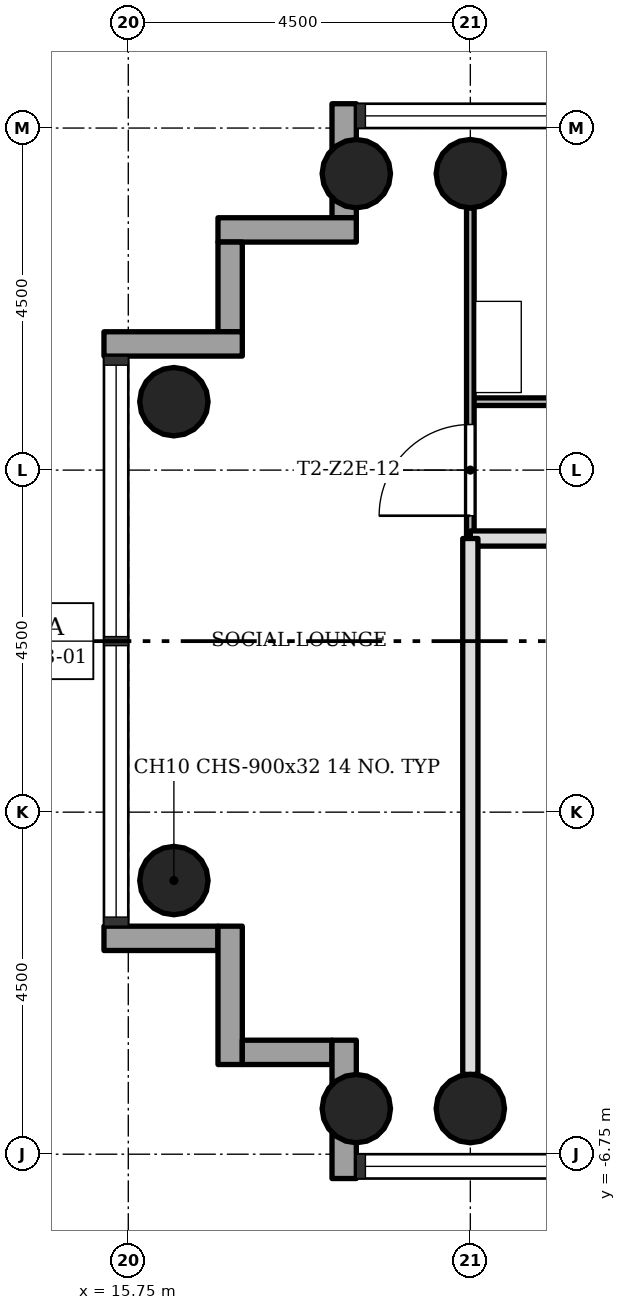
"""IFC4 building model, lengths in metres.
Left out: names, types, materials, properties, quantities, classifications, styles, units other than length and angle.
Written with IfcOpenShell. Run it as: python <this file> out.ifc"""

import sys

from ifc_helpers import new_model, si_unit, direction, frame, frame_2d, origin, origin_2d, place, context, subcontext, project, spatial, rectangle, hollow_circle, extrude, element, fill, save


model = new_model("IFC4")
c1 = context("Model", 3, precision=1e-05, world=origin(), true_north=direction((0.0, 1.0)))
c2 = subcontext(c1, "Body", "Model", "MODEL_VIEW")
j1 = project(units=[si_unit("LENGTHUNIT", "METRE"), si_unit("PLANEANGLEUNIT", "RADIAN")], contexts=[c1])
p1 = place(None, origin())
s1 = spatial("IfcSite", under=j1, at=p1, CompositionType="ELEMENT")
p2 = place(p1, origin())
s2 = spatial("IfcBuilding", under=s1, at=p2, CompositionType="ELEMENT")
p3 = place(p2, frame((0.0, 0.0, 103.8)))
s3 = spatial("IfcBuildingStorey", under=s2, at=p3, CompositionType="ELEMENT", Elevation=103.8)
for number, where, z_axis, x_axis in (
    (1, (20.25, 6.15, 0.0), (0.0, 0.0, 1.0), (1.0, 0.0, 0.0)),
    (2, (20.25, -6.15, 0.0), (0.0, 0.0, 1.0), (1.0, 0.0, 0.0)),
    (3, (18.75, 6.15, 0.0), (0.0, 0.0, 1.0), (1.0, 0.0, 0.0)),
    (4, (18.75, -6.15, 0.0), (0.0, 0.0, 1.0), (1.0, 0.0, 0.0)),
    (5, (16.35, 3.15, 0.0), (0.0, 0.0, 1.0), (1.0, 0.0, 0.0)),
    (6, (16.35, -3.15, 0.0), (0.0, 0.0, 1.0), (1.0, 0.0, 0.0)),
):
    element("IfcColumn", number, at=place(p3, frame(where, z_axis=z_axis, x_axis=x_axis)), inside=s3, PredefinedType="COLUMN", context=c2, shape_type="SweptSolid", body=[
        extrude(hollow_circle(Radius=0.45, WallThickness=0.032, at=origin_2d()), origin(), (0.0, 0.0, 1.0), 3.4),
    ])
p4 = place(p3, frame((18.59, 7.07, -0.3), z_axis=(0.0, 0.0, 1.0), x_axis=(0.0, -1.0, 0.0)))
e7 = element("IfcWall", 7, at=p4, inside=s3, PredefinedType="STANDARD", context=c2, shape_type="SweptSolid", body=[
    extrude(rectangle(XDim=1.5, YDim=0.32, at=frame_2d((0.75, 0.0))), origin(), (0.0, 0.0, 1.0), 3.4),
])
p5 = place(p3, frame((18.75, 5.41, -0.3), z_axis=(0.0, 0.0, 1.0), x_axis=(-1.0, 0.0, 0.0)))
e8 = element("IfcWall", 8, at=p5, inside=s3, PredefinedType="STANDARD", context=c2, shape_type="SweptSolid", body=[
    extrude(rectangle(XDim=1.82, YDim=0.32, at=frame_2d((0.91, 0.0))), origin(), (0.0, 0.0, 1.0), 3.4),
])
p6 = place(p3, frame((17.09, 5.25, -0.3), z_axis=(0.0, 0.0, 1.0), x_axis=(0.0, -1.0, 0.0)))
e9 = element("IfcWall", 9, at=p6, inside=s3, PredefinedType="STANDARD", context=c2, shape_type="SweptSolid", body=[
    extrude(rectangle(XDim=1.18, YDim=0.32, at=frame_2d((0.59, 0.0))), origin(), (0.0, 0.0, 1.0), 3.4),
])
p7 = place(p3, frame((17.25, 3.91, -0.3), z_axis=(0.0, 0.0, 1.0), x_axis=(-1.0, 0.0, 0.0)))
e10 = element("IfcWall", 10, at=p7, inside=s3, PredefinedType="STANDARD", context=c2, shape_type="SweptSolid", body=[
    extrude(rectangle(XDim=1.82, YDim=0.32, at=frame_2d((0.91, 0.0))), origin(), (0.0, 0.0, 1.0), 3.4),
])
p8 = place(p3, frame((15.43, -3.91, -0.3), z_axis=(0.0, 0.0, 1.0), x_axis=(1.0, 0.0, 0.0)))
e11 = element("IfcWall", 11, at=p8, inside=s3, PredefinedType="STANDARD", context=c2, shape_type="SweptSolid", body=[
    extrude(rectangle(XDim=1.5, YDim=0.32, at=frame_2d((0.75, 0.0))), origin(), (0.0, 0.0, 1.0), 3.4),
])
p9 = place(p3, frame((17.09, -3.75, -0.3), z_axis=(0.0, 0.0, 1.0), x_axis=(0.0, -1.0, 0.0)))
e12 = element("IfcWall", 12, at=p9, inside=s3, PredefinedType="STANDARD", context=c2, shape_type="SweptSolid", body=[
    extrude(rectangle(XDim=1.82, YDim=0.32, at=frame_2d((0.91, 0.0))), origin(), (0.0, 0.0, 1.0), 3.4),
])
p10 = place(p3, frame((17.25, -5.41, -0.3), z_axis=(0.0, 0.0, 1.0), x_axis=(1.0, 0.0, 0.0)))
e13 = element("IfcWall", 13, at=p10, inside=s3, PredefinedType="STANDARD", context=c2, shape_type="SweptSolid", body=[
    extrude(rectangle(XDim=1.18, YDim=0.32, at=frame_2d((0.59, 0.0))), origin(), (0.0, 0.0, 1.0), 3.4),
])
p11 = place(p3, frame((18.59, -5.25, -0.3), z_axis=(0.0, 0.0, 1.0), x_axis=(0.0, -1.0, 0.0)))
e14 = element("IfcWall", 14, at=p11, inside=s3, PredefinedType="STANDARD", context=c2, shape_type="SweptSolid", body=[
    extrude(rectangle(XDim=1.82, YDim=0.32, at=frame_2d((0.91, 0.0))), origin(), (0.0, 0.0, 1.0), 3.4),
])
p12 = place(p3, frame((27.45, 1.35, 0.0), z_axis=(0.0, 0.0, 1.0), x_axis=(-1.0, 0.0, 0.0)))
e15 = element("IfcWall", 15, at=p12, inside=s3, PredefinedType="SOLIDWALL", context=c2, shape_type="SweptSolid", body=[
    extrude(rectangle(XDim=7.2, YDim=0.2, at=frame_2d((3.6, 0.0))), origin(), (0.0, 0.0, 1.0), 3.0),
])
p13 = place(p12, frame((4.35, 0.0, 0.0)))
e16 = element("IfcOpeningElement", 16, at=p13, cuts=e15, PredefinedType="OPENING", context=c2, shape_type="SweptSolid", body=[
    extrude(rectangle(XDim=0.9, YDim=2.1, at=frame_2d((0.45, 1.05))), frame((0.0, 0.11, 0.0), z_axis=(0.0, -1.0, 0.0), x_axis=(1.0, 0.0, 0.0)), (0.0, 0.0, 1.0), 0.22),
])
p14 = place(p3, frame((29.25, 3.15, 0.0), z_axis=(0.0, 0.0, 1.0), x_axis=(-1.0, 0.0, 0.0)))
e17 = element("IfcWall", 17, at=p14, inside=s3, PredefinedType="PARTITIONING", context=c2, shape_type="SweptSolid", body=[
    extrude(rectangle(XDim=9.0, YDim=0.1, at=frame_2d((4.5, 0.0))), origin(), (0.0, 0.0, 1.0), 3.0),
])
p15 = place(p14, frame((2.55, 0.0, 0.0)))
e18 = element("IfcOpeningElement", 18, at=p15, cuts=e17, PredefinedType="OPENING", context=c2, shape_type="SweptSolid", body=[
    extrude(rectangle(XDim=0.9, YDim=2.1, at=frame_2d((0.45, 1.05))), frame((0.0, 0.06, 0.0), z_axis=(0.0, -1.0, 0.0), x_axis=(1.0, 0.0, 0.0)), (0.0, 0.0, 1.0), 0.12),
])
p16 = place(p3, frame((20.25, 1.35, 0.0), z_axis=(0.0, 0.0, 1.0), x_axis=(0.0, 1.0, 0.0)))
e19 = element("IfcWall", 19, at=p16, inside=s3, PredefinedType="PARTITIONING", context=c2, shape_type="SweptSolid", body=[
    extrude(rectangle(XDim=4.35, YDim=0.1, at=frame_2d((2.175, 0.0))), origin(), (0.0, 0.0, 1.0), 3.0),
])
p17 = place(p16, frame((0.3, 0.0, 0.0)))
e20 = element("IfcOpeningElement", 20, at=p17, cuts=e19, PredefinedType="OPENING", context=c2, shape_type="SweptSolid", body=[
    extrude(rectangle(XDim=1.2, YDim=2.1, at=frame_2d((0.6, 1.05))), frame((0.0, 0.06, 0.0), z_axis=(0.0, -1.0, 0.0), x_axis=(1.0, 0.0, 0.0)), (0.0, 0.0, 1.0), 0.12),
])
p18 = place(p3, frame((20.25, -5.7, 0.0), z_axis=(0.0, 0.0, 1.0), x_axis=(0.0, 1.0, 0.0)))
e21 = element("IfcWall", 21, at=p18, inside=s3, PredefinedType="SOLIDWALL", context=c2, shape_type="SweptSolid", body=[
    extrude(rectangle(XDim=7.05, YDim=0.2, at=frame_2d((3.525, 0.0))), origin(), (0.0, 0.0, 1.0), 3.0),
])
p19 = place(p17, origin())
e22 = element("IfcDoor", 22, at=p19, inside=s3, OperationType="SINGLE_SWING_RIGHT", PredefinedType="DOOR", context=c2, shape_type="SweptSolid", body=[
    extrude(rectangle(XDim=1.2, YDim=2.1, at=frame_2d((0.6, 1.05))), frame((0.0, 0.025, 0.0), z_axis=(0.0, -1.0, 0.0), x_axis=(1.0, 0.0, 0.0)), (0.0, 0.0, 1.0), 0.05),
])
fill(e20, e22)
save(model, sys.argv[1])
